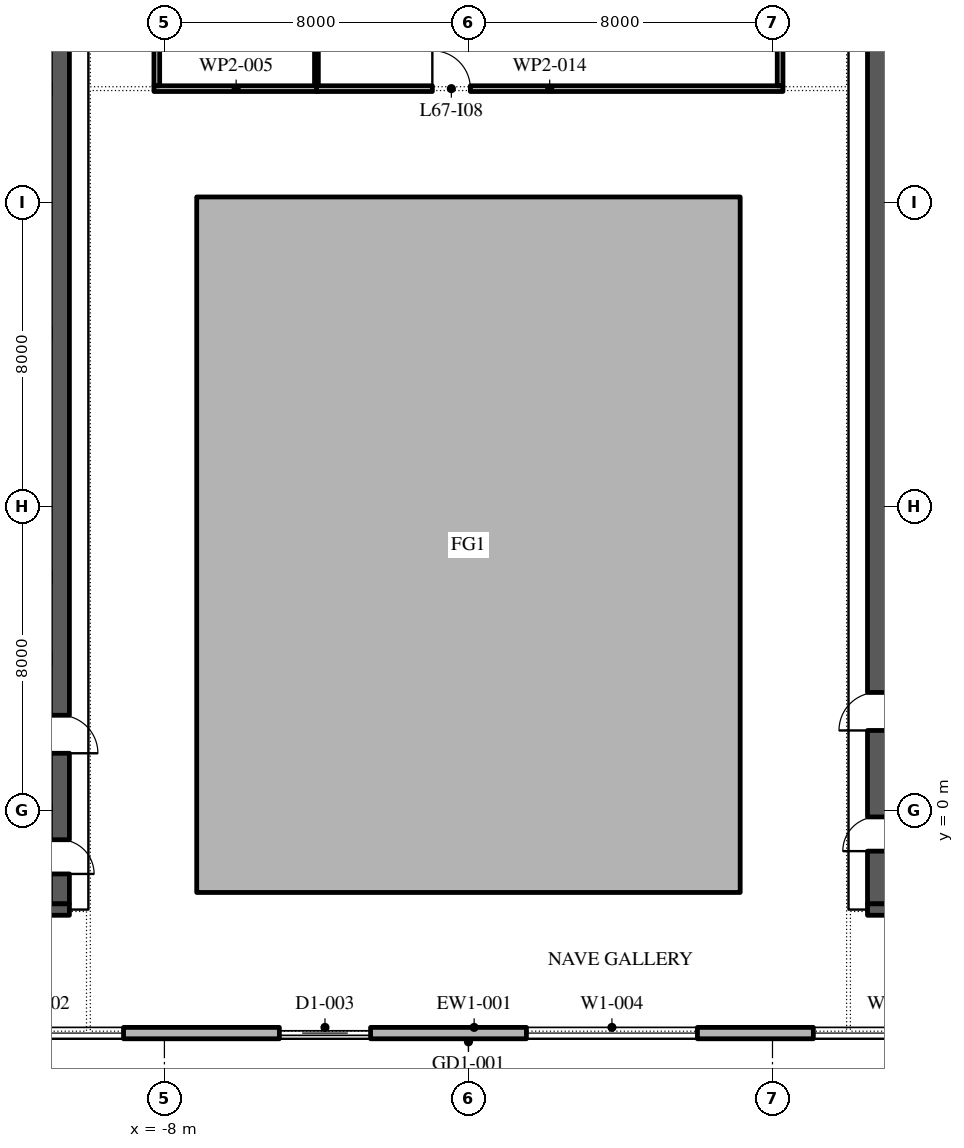
"""IFC4 building model, lengths in metres.
Left out: names, types, materials, properties, quantities, classifications, styles, units other than length and angle.
Written with IfcOpenShell. Run it as: python <this file> out.ifc"""

import sys

from ifc_helpers import new_model, si_unit, direction, frame, frame_2d, origin, place, context, subcontext, project, spatial, polyline, rectangle, outline, extrude, element, fill, save


model = new_model("IFC4")
c1 = context("Model", 3, precision=1e-05, world=origin(), true_north=direction((0.0, 1.0)))
c2 = subcontext(c1, "Body", "Model", "MODEL_VIEW")
j1 = project(units=[si_unit("LENGTHUNIT", "METRE"), si_unit("PLANEANGLEUNIT", "RADIAN")], contexts=[c1])
p1 = place(None, origin())
s1 = spatial("IfcSite", under=j1, at=p1, CompositionType="ELEMENT")
p2 = place(p1, origin())
s2 = spatial("IfcBuilding", under=s1, at=p2, CompositionType="ELEMENT")
p3 = place(p2, frame((0.0, 0.0, 309.0)))
s3 = spatial("IfcBuildingStorey", under=s2, at=p3, CompositionType="ELEMENT", Elevation=309.0)
p4 = place(p3, origin())
e1 = element("IfcWall", 1, at=p4, inside=s3, PredefinedType="STANDARD", context=c2, shape_type="SweptSolid", body=[
    extrude(outline(polyline([(-7.15, -2.15), (7.15, -2.15), (7.15, 16.15), (-7.15, 16.15), (-7.15, -2.15)]), holes=[polyline([(-7.0, -2.0), (-7.0, 16.0), (7.0, 16.0), (7.0, -2.0), (-7.0, -2.0)])]), origin(), (0.0, 0.0, 1.0), 4.0),
])
p5 = place(p3, frame((-22.35, -5.85, 0.0), z_axis=(0.0, 0.0, 1.0), x_axis=(1.0, 0.0, 0.0)))
e2 = element("IfcWall", 2, at=p5, inside=s3, PredefinedType="STANDARD", context=c2, shape_type="SweptSolid", body=[
    extrude(rectangle(XDim=45.0, YDim=0.3, at=frame_2d((22.5, 0.0))), origin(), (0.0, 0.0, 1.0), 4.0),
])
p6 = place(p5, frame((1.375, 0.0, 0.45)))
e3 = element("IfcOpeningElement", 3, at=p6, cuts=e2, PredefinedType="OPENING", context=c2, shape_type="SweptSolid", body=[
    extrude(rectangle(XDim=4.5, YDim=3.05, at=frame_2d((2.25, 1.525))), frame((0.0, 0.16, 0.0), z_axis=(0.0, -1.0, 0.0), x_axis=(1.0, 0.0, 0.0)), (0.0, 0.0, 1.0), 0.32),
])
p7 = place(p5, frame((8.775, 0.0, 0.45)))
e4 = element("IfcOpeningElement", 4, at=p7, cuts=e2, PredefinedType="OPENING", context=c2, shape_type="SweptSolid", body=[
    extrude(rectangle(XDim=4.5, YDim=3.05, at=frame_2d((2.25, 1.525))), frame((0.0, 0.16, 0.0), z_axis=(0.0, -1.0, 0.0), x_axis=(1.0, 0.0, 0.0)), (0.0, 0.0, 1.0), 0.32),
])
p8 = place(p5, frame((17.375, 0.0, 0.0)))
e5 = element("IfcOpeningElement", 5, at=p8, cuts=e2, PredefinedType="OPENING", context=c2, shape_type="SweptSolid", body=[
    extrude(rectangle(XDim=2.4, YDim=3.5, at=frame_2d((1.2, 1.75))), frame((0.0, 0.16, 0.0), z_axis=(0.0, -1.0, 0.0), x_axis=(1.0, 0.0, 0.0)), (0.0, 0.0, 1.0), 0.32),
])
p9 = place(p5, frame((23.875, 0.0, 0.45)))
e6 = element("IfcOpeningElement", 6, at=p9, cuts=e2, PredefinedType="OPENING", context=c2, shape_type="SweptSolid", body=[
    extrude(rectangle(XDim=4.5, YDim=3.05, at=frame_2d((2.25, 1.525))), frame((0.0, 0.16, 0.0), z_axis=(0.0, -1.0, 0.0), x_axis=(1.0, 0.0, 0.0)), (0.0, 0.0, 1.0), 0.32),
])
p10 = place(p5, frame((31.425, 0.0, 0.45)))
e7 = element("IfcOpeningElement", 7, at=p10, cuts=e2, PredefinedType="OPENING", context=c2, shape_type="SweptSolid", body=[
    extrude(rectangle(XDim=4.5, YDim=3.05, at=frame_2d((2.25, 1.525))), frame((0.0, 0.16, 0.0), z_axis=(0.0, -1.0, 0.0), x_axis=(1.0, 0.0, 0.0)), (0.0, 0.0, 1.0), 0.32),
])
p11 = place(p5, frame((38.975, 0.0, 0.45)))
e8 = element("IfcOpeningElement", 8, at=p11, cuts=e2, PredefinedType="OPENING", context=c2, shape_type="SweptSolid", body=[
    extrude(rectangle(XDim=4.5, YDim=3.05, at=frame_2d((2.25, 1.525))), frame((0.0, 0.16, 0.0), z_axis=(0.0, -1.0, 0.0), x_axis=(1.0, 0.0, 0.0)), (0.0, 0.0, 1.0), 0.32),
])
p12 = place(p3, frame((-10.75, -2.45, 0.0), z_axis=(0.0, 0.0, 1.0), x_axis=(0.0, 1.0, 0.0)))
e9 = element("IfcWall", 9, at=p12, inside=s3, PredefinedType="SHEAR", context=c2, shape_type="SweptSolid", body=[
    extrude(rectangle(XDim=27.9, YDim=0.5, at=frame_2d((13.95, 0.0))), origin(), (0.0, 0.0, 1.0), 4.0),
])
p13 = place(p12, frame((23.65, 0.0, 0.0)))
e10 = element("IfcOpeningElement", 10, at=p13, cuts=e9, PredefinedType="OPENING", context=c2, shape_type="SweptSolid", body=[
    extrude(rectangle(XDim=2.4, YDim=2.1, at=frame_2d((1.2, 1.05))), frame((0.0, 0.26, 0.0), z_axis=(0.0, -1.0, 0.0), x_axis=(1.0, 0.0, 0.0)), (0.0, 0.0, 1.0), 0.52),
])
p14 = place(p12, frame((0.788, 0.0, 0.0)))
e11 = element("IfcOpeningElement", 11, at=p14, cuts=e9, PredefinedType="OPENING", context=c2, shape_type="SweptSolid", body=[
    extrude(rectangle(XDim=0.9, YDim=2.1, at=frame_2d((0.45, 1.05))), frame((0.0, 0.26, 0.0), z_axis=(0.0, -1.0, 0.0), x_axis=(1.0, 0.0, 0.0)), (0.0, 0.0, 1.0), 0.52),
])
p15 = place(p12, frame((3.962, 0.0, 0.0)))
e12 = element("IfcOpeningElement", 12, at=p15, cuts=e9, PredefinedType="OPENING", context=c2, shape_type="SweptSolid", body=[
    extrude(rectangle(XDim=1.0, YDim=2.1, at=frame_2d((0.5, 1.05))), frame((0.0, 0.26, 0.0), z_axis=(0.0, -1.0, 0.0), x_axis=(1.0, 0.0, 0.0)), (0.0, 0.0, 1.0), 0.52),
])
p16 = place(p3, frame((-21.5, -2.6, 0.0), z_axis=(0.0, 0.0, 1.0), x_axis=(1.0, 0.0, 0.0)))
e13 = element("IfcWall", 13, at=p16, inside=s3, PredefinedType="SHEAR", context=c2, shape_type="SweptSolid", body=[
    extrude(rectangle(XDim=11.0, YDim=0.3, at=frame_2d((5.5, 0.0))), origin(), (0.0, 0.0, 1.0), 4.0),
])
p17 = place(p3, frame((10.75, -2.45, 0.0), z_axis=(0.0, 0.0, 1.0), x_axis=(0.0, 1.0, 0.0)))
e14 = element("IfcWall", 14, at=p17, inside=s3, PredefinedType="SHEAR", context=c2, shape_type="SweptSolid", body=[
    extrude(rectangle(XDim=27.9, YDim=0.5, at=frame_2d((13.95, 0.0))), origin(), (0.0, 0.0, 1.0), 4.0),
])
p18 = place(p17, frame((23.65, 0.0, 0.0)))
e15 = element("IfcOpeningElement", 15, at=p18, cuts=e14, PredefinedType="OPENING", context=c2, shape_type="SweptSolid", body=[
    extrude(rectangle(XDim=2.4, YDim=2.1, at=frame_2d((1.2, 1.05))), frame((0.0, 0.26, 0.0), z_axis=(0.0, -1.0, 0.0), x_axis=(1.0, 0.0, 0.0)), (0.0, 0.0, 1.0), 0.52),
])
p19 = place(p17, frame((1.387, 0.0, 0.0)))
e16 = element("IfcOpeningElement", 16, at=p19, cuts=e14, PredefinedType="OPENING", context=c2, shape_type="SweptSolid", body=[
    extrude(rectangle(XDim=0.9, YDim=2.1, at=frame_2d((0.45, 1.05))), frame((0.0, 0.26, 0.0), z_axis=(0.0, -1.0, 0.0), x_axis=(1.0, 0.0, 0.0)), (0.0, 0.0, 1.0), 0.52),
])
p20 = place(p17, frame((4.562, 0.0, 0.0)))
e17 = element("IfcOpeningElement", 17, at=p20, cuts=e14, PredefinedType="OPENING", context=c2, shape_type="SweptSolid", body=[
    extrude(rectangle(XDim=1.0, YDim=2.1, at=frame_2d((0.5, 1.05))), frame((0.0, 0.26, 0.0), z_axis=(0.0, -1.0, 0.0), x_axis=(1.0, 0.0, 0.0)), (0.0, 0.0, 1.0), 0.52),
])
p21 = place(p3, frame((10.5, -2.6, 0.0), z_axis=(0.0, 0.0, 1.0), x_axis=(1.0, 0.0, 0.0)))
e18 = element("IfcWall", 18, at=p21, inside=s3, PredefinedType="SHEAR", context=c2, shape_type="SweptSolid", body=[
    extrude(rectangle(XDim=11.0, YDim=0.3, at=frame_2d((5.5, 0.0))), origin(), (0.0, 0.0, 1.0), 4.0),
])
p22 = place(p3, frame((-8.275, 19.0, 0.0), z_axis=(0.0, 0.0, 1.0), x_axis=(1.0, 0.0, 0.0)))
e19 = element("IfcWall", 19, at=p22, inside=s3, PredefinedType="PARTITIONING", context=c2, shape_type="SweptSolid", body=[
    extrude(rectangle(XDim=4.325, YDim=0.15, at=frame_2d((2.163, 0.0))), origin(), (0.0, 0.0, 1.0), 4.0),
])
p23 = place(p3, frame((-8.2, 25.55, 0.0), z_axis=(0.0, 0.0, 1.0), x_axis=(0.0, -1.0, 0.0)))
e20 = element("IfcWall", 20, at=p23, inside=s3, PredefinedType="PARTITIONING", context=c2, shape_type="SweptSolid", body=[
    extrude(rectangle(XDim=6.475, YDim=0.15, at=frame_2d((3.238, 0.0))), origin(), (0.0, 0.0, 1.0), 4.0),
])
p24 = place(p23, frame((2.9, 0.0, 0.0)))
e21 = element("IfcOpeningElement", 21, at=p24, cuts=e20, PredefinedType="OPENING", context=c2, shape_type="SweptSolid", body=[
    extrude(rectangle(XDim=1.0, YDim=2.1, at=frame_2d((0.5, 1.05))), frame((0.0, 0.085, 0.0), z_axis=(0.0, -1.0, 0.0), x_axis=(1.0, 0.0, 0.0)), (0.0, 0.0, 1.0), 0.17),
])
p25 = place(p3, frame((-4.0, 19.075, 0.0), z_axis=(0.0, 0.0, 1.0), x_axis=(0.0, 1.0, 0.0)))
e22 = element("IfcWall", 22, at=p25, inside=s3, PredefinedType="PARTITIONING", context=c2, shape_type="SweptSolid", body=[
    extrude(rectangle(XDim=6.475, YDim=0.1, at=frame_2d((3.238, 0.0))), origin(), (0.0, 0.0, 1.0), 4.0),
])
p26 = place(p3, frame((-4.0, 19.0, 0.0), z_axis=(0.0, 0.0, 1.0), x_axis=(1.0, 0.0, 0.0)))
e23 = element("IfcWall", 23, at=p26, inside=s3, PredefinedType="PARTITIONING", context=c2, shape_type="SweptSolid", body=[
    extrude(rectangle(XDim=12.275, YDim=0.15, at=frame_2d((6.137, 0.0))), origin(), (0.0, 0.0, 1.0), 4.0),
])
p27 = place(p26, frame((3.05, 0.0, 0.0)))
e24 = element("IfcOpeningElement", 24, at=p27, cuts=e23, PredefinedType="OPENING", context=c2, shape_type="SweptSolid", body=[
    extrude(rectangle(XDim=1.0, YDim=2.1, at=frame_2d((0.5, 1.05))), frame((0.0, 0.085, 0.0), z_axis=(0.0, -1.0, 0.0), x_axis=(1.0, 0.0, 0.0)), (0.0, 0.0, 1.0), 0.17),
])
p28 = place(p3, frame((8.2, 19.075, 0.0), z_axis=(0.0, 0.0, 1.0), x_axis=(0.0, 1.0, 0.0)))
e25 = element("IfcWall", 25, at=p28, inside=s3, PredefinedType="PARTITIONING", context=c2, shape_type="SweptSolid", body=[
    extrude(rectangle(XDim=6.425, YDim=0.15, at=frame_2d((3.212, 0.0))), origin(), (0.0, 0.0, 1.0), 4.0),
])
p29 = place(p7, origin())
e26 = element("IfcWindow", 26, at=p29, inside=s3, PartitioningType="DOUBLE_PANEL_VERTICAL", PredefinedType="WINDOW", context=c2, shape_type="SweptSolid", body=[
    extrude(rectangle(XDim=4.5, YDim=3.05, at=frame_2d((2.25, 1.525))), frame((0.0, 0.03, 0.0), z_axis=(0.0, -1.0, 0.0), x_axis=(1.0, 0.0, 0.0)), (0.0, 0.0, 1.0), 0.06),
])
fill(e4, e26)
p30 = place(p8, origin())
e27 = element("IfcDoor", 27, at=p30, inside=s3, OperationType="DOUBLE_DOOR_SLIDING", PredefinedType="DOOR", context=c2, shape_type="SweptSolid", body=[
    extrude(rectangle(XDim=2.4, YDim=3.5, at=frame_2d((1.2, 1.75))), frame((0.0, 0.025, 0.0), z_axis=(0.0, -1.0, 0.0), x_axis=(1.0, 0.0, 0.0)), (0.0, 0.0, 1.0), 0.05),
])
fill(e5, e27)
p31 = place(p9, origin())
e28 = element("IfcWindow", 28, at=p31, inside=s3, PartitioningType="DOUBLE_PANEL_VERTICAL", PredefinedType="WINDOW", context=c2, shape_type="SweptSolid", body=[
    extrude(rectangle(XDim=4.5, YDim=3.05, at=frame_2d((2.25, 1.525))), frame((0.0, 0.03, 0.0), z_axis=(0.0, -1.0, 0.0), x_axis=(1.0, 0.0, 0.0)), (0.0, 0.0, 1.0), 0.06),
])
fill(e6, e28)
p32 = place(p10, origin())
e29 = element("IfcWindow", 29, at=p32, inside=s3, PartitioningType="DOUBLE_PANEL_VERTICAL", PredefinedType="WINDOW", context=c2, shape_type="SweptSolid", body=[
    extrude(rectangle(XDim=4.5, YDim=3.05, at=frame_2d((2.25, 1.525))), frame((0.0, 0.03, 0.0), z_axis=(0.0, -1.0, 0.0), x_axis=(1.0, 0.0, 0.0)), (0.0, 0.0, 1.0), 0.06),
])
fill(e7, e29)
p33 = place(p27, origin())
e30 = element("IfcDoor", 30, at=p33, inside=s3, OperationType="SINGLE_SWING_RIGHT", PredefinedType="DOOR", context=c2, shape_type="SweptSolid", body=[
    extrude(rectangle(XDim=1.0, YDim=2.1, at=frame_2d((0.5, 1.05))), frame((0.0, 0.025, 0.0), z_axis=(0.0, -1.0, 0.0), x_axis=(1.0, 0.0, 0.0)), (0.0, 0.0, 1.0), 0.05),
])
fill(e24, e30)
save(model, sys.argv[1])
